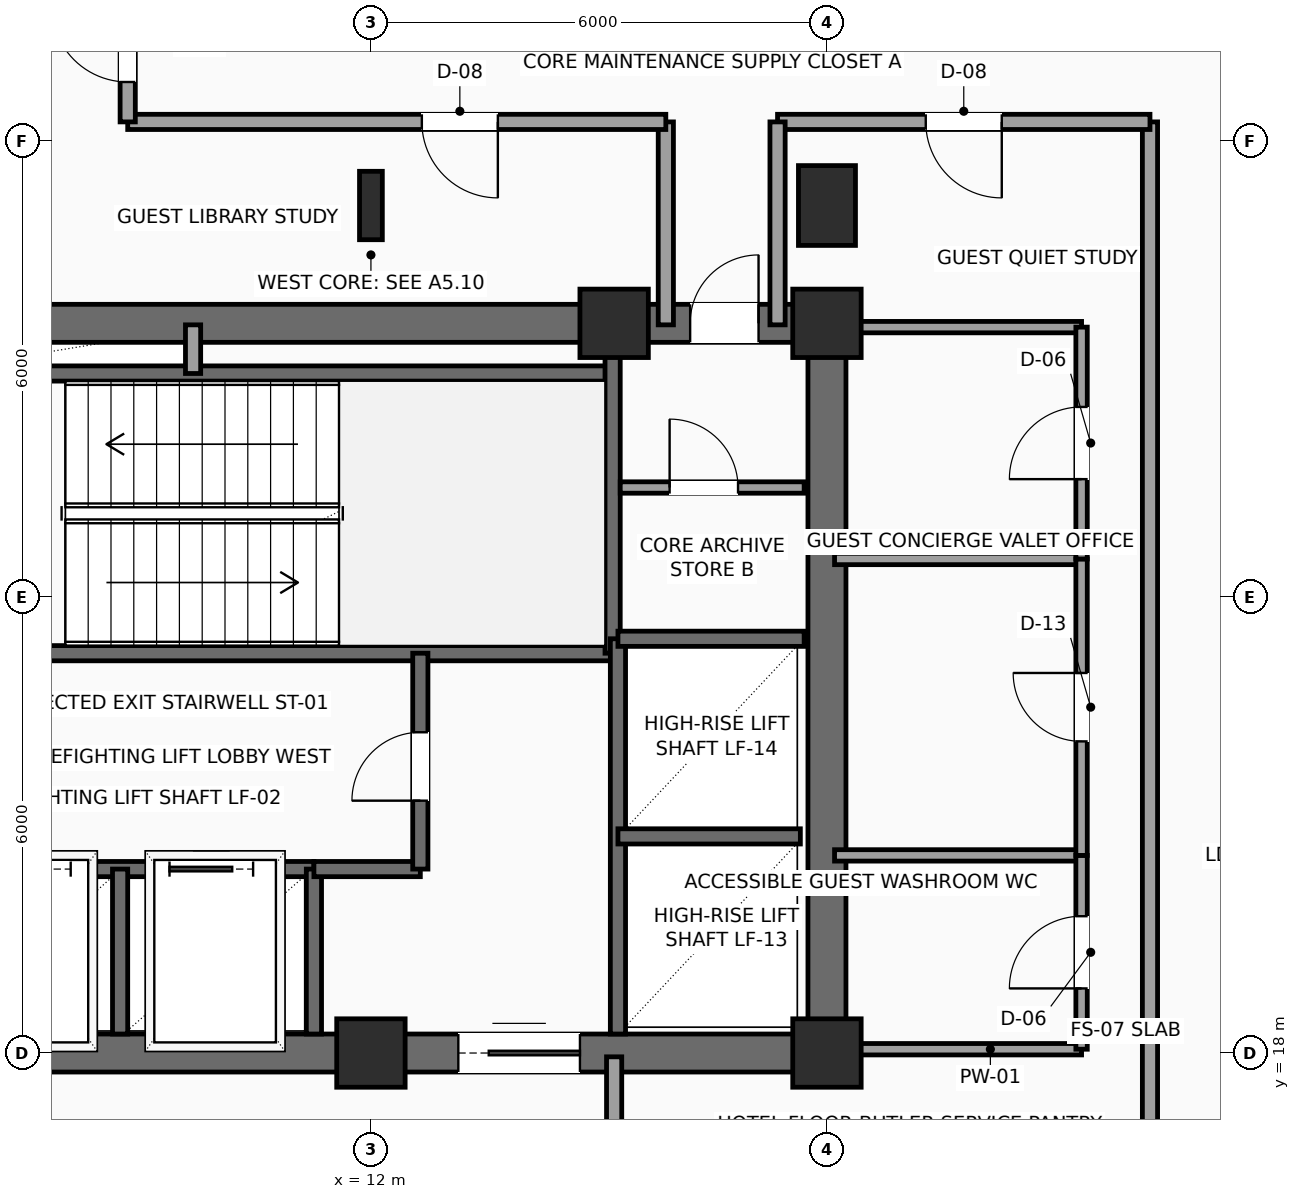
"""IFC4 building model, lengths in metres.
Left out: names, types, materials, properties, quantities, classifications, styles, units other than length and angle.
Written with IfcOpenShell. Run it as: python <this file> out.ifc"""

import sys

from ifc_helpers import new_model, si_unit, direction, frame, frame_2d, origin, origin_2d, place, context, subcontext, project, spatial, rectangle, i_section, extrude, element, fill, save


model = new_model("IFC4")
c1 = context("Model", 3, precision=1e-05, world=origin(), true_north=direction((0.0, 1.0)))
c2 = subcontext(c1, "Body", "Model", "MODEL_VIEW")
j1 = project(units=[si_unit("LENGTHUNIT", "METRE"), si_unit("PLANEANGLEUNIT", "RADIAN")], contexts=[c1])
p1 = place(None, origin())
s1 = spatial("IfcSite", under=j1, at=p1, CompositionType="ELEMENT")
p2 = place(p1, origin())
s2 = spatial("IfcBuilding", under=s1, at=p2, CompositionType="ELEMENT")
p3 = place(p2, frame((0.0, 0.0, 176.7)))
s3 = spatial("IfcBuildingStorey", under=s2, at=p3, CompositionType="ELEMENT", Elevation=176.7)
for number, where, z_axis, x_axis in (
    (1, (12.0, 18.0, 0.0), (0.0, 0.0, 1.0), (1.0, 0.0, 0.0)),
    (2, (18.0, 18.0, 0.0), (0.0, 0.0, 1.0), (1.0, 0.0, 0.0)),
    (3, (15.2, 27.6, 0.0), (0.0, 0.0, 1.0), (1.0, 0.0, 0.0)),
    (4, (18.0, 27.6, 0.0), (0.0, 0.0, 1.0), (1.0, 0.0, 0.0)),
):
    element("IfcColumn", number, at=place(p3, frame(where, z_axis=z_axis, x_axis=x_axis)), inside=s3, PredefinedType="COLUMN", context=c2, shape_type="SweptSolid", body=[
        extrude(rectangle(XDim=0.9, YDim=0.9, at=origin_2d()), origin(), (0.0, 0.0, 1.0), 3.75),
    ])
p4 = place(p3, frame((12.0, 29.15, 0.0), z_axis=(0.0, 0.0, 1.0), x_axis=(1.0, 0.0, 0.0)))
e5 = element("IfcColumn", 5, at=p4, inside=s3, PredefinedType="COLUMN", context=c2, shape_type="SweptSolid", body=[
    extrude(i_section(OverallWidth=0.3, OverallDepth=0.9, WebThickness=0.019, FlangeThickness=0.035, FilletRadius=0.03, at=origin_2d()), origin(), (0.0, 0.0, 1.0), 3.75),
])
p5 = place(p3, frame((18.0, 29.15, 0.0), z_axis=(0.0, 0.0, 1.0), x_axis=(1.0, 0.0, 0.0)))
e6 = element("IfcColumn", 6, at=p5, inside=s3, PredefinedType="COLUMN", context=c2, shape_type="SweptSolid", body=[
    extrude(rectangle(XDim=0.75, YDim=1.05, at=origin_2d()), origin(), (0.0, 0.0, 1.0), 3.75),
])
p6 = place(p3, frame((6.0, 18.0, 0.0), z_axis=(0.0, 0.0, 1.0), x_axis=(1.0, 0.0, 0.0)))
e7 = element("IfcWall", 7, at=p6, inside=s3, PredefinedType="SHEAR", context=c2, shape_type="SweptSolid", body=[
    extrude(rectangle(XDim=12.0, YDim=0.5, at=frame_2d((6.0, 0.0))), origin(), (0.0, 0.0, 1.0), 3.54),
])
p7 = place(p6, frame((7.15, 0.0, 0.0)))
e8 = element("IfcOpeningElement", 8, at=p7, cuts=e7, PredefinedType="OPENING", context=c2, shape_type="SweptSolid", body=[
    extrude(rectangle(XDim=1.6, YDim=2.3, at=frame_2d((0.8, 1.15))), frame((0.0, 0.26, 0.0), z_axis=(0.0, -1.0, 0.0), x_axis=(1.0, 0.0, 0.0)), (0.0, 0.0, 1.0), 0.52),
])
p8 = place(p3, frame((6.0, 27.6, 0.0), z_axis=(0.0, 0.0, 1.0), x_axis=(1.0, 0.0, 0.0)))
e9 = element("IfcWall", 9, at=p8, inside=s3, PredefinedType="SHEAR", context=c2, shape_type="SweptSolid", body=[
    extrude(rectangle(XDim=12.0, YDim=0.5, at=frame_2d((6.0, 0.0))), origin(), (0.0, 0.0, 1.0), 3.54),
])
p9 = place(p8, frame((10.2, 0.0, 0.0)))
e10 = element("IfcOpeningElement", 10, at=p9, cuts=e9, PredefinedType="OPENING", context=c2, shape_type="SweptSolid", body=[
    extrude(rectangle(XDim=0.9, YDim=2.15, at=frame_2d((0.45, 1.075))), frame((0.0, 0.26, 0.0), z_axis=(0.0, -1.0, 0.0), x_axis=(1.0, 0.0, 0.0)), (0.0, 0.0, 1.0), 0.52),
])
p10 = place(p3, frame((18.0, 18.0, 0.0), z_axis=(0.0, 0.0, 1.0), x_axis=(0.0, 1.0, 0.0)))
e11 = element("IfcWall", 11, at=p10, inside=s3, PredefinedType="SHEAR", context=c2, shape_type="SweptSolid", body=[
    extrude(rectangle(XDim=9.6, YDim=0.5, at=frame_2d((4.8, 0.0))), origin(), (0.0, 0.0, 1.0), 3.54),
])
p11 = place(p3, frame((6.3, 23.26, 0.0), z_axis=(0.0, 0.0, 1.0), x_axis=(1.0, 0.0, 0.0)))
e12 = element("IfcWall", 12, at=p11, inside=s3, PredefinedType="SHEAR", context=c2, shape_type="SweptSolid", body=[
    extrude(rectangle(XDim=8.88, YDim=0.2, at=frame_2d((4.44, 0.0))), origin(), (0.0, 0.0, 1.0), 3.54),
])
p12 = place(p11, frame((0.35, 0.0, 0.0)))
e13 = element("IfcOpeningElement", 13, at=p12, cuts=e12, PredefinedType="OPENING", context=c2, shape_type="SweptSolid", body=[
    extrude(rectangle(XDim=1.1, YDim=2.2, at=frame_2d((0.55, 1.1))), frame((0.0, 0.11, 0.0), z_axis=(0.0, -1.0, 0.0), x_axis=(1.0, 0.0, 0.0)), (0.0, 0.0, 1.0), 0.22),
])
p13 = place(p3, frame((6.3, 26.94, 0.0), z_axis=(0.0, 0.0, 1.0), x_axis=(1.0, 0.0, 0.0)))
e14 = element("IfcWall", 14, at=p13, inside=s3, PredefinedType="SHEAR", context=c2, shape_type="SweptSolid", body=[
    extrude(rectangle(XDim=8.88, YDim=0.2, at=frame_2d((4.44, 0.0))), origin(), (0.0, 0.0, 1.0), 3.54),
])
p14 = place(p3, frame((15.18, 23.26, 0.0), z_axis=(0.0, 0.0, 1.0), x_axis=(0.0, 1.0, 0.0)))
e15 = element("IfcWall", 15, at=p14, inside=s3, PredefinedType="SHEAR", context=c2, shape_type="SweptSolid", body=[
    extrude(rectangle(XDim=4.04, YDim=0.2, at=frame_2d((2.02, 0.0))), origin(), (0.0, 0.0, 1.0), 3.54),
])
p15 = place(p3, frame((6.3, 20.42, 0.0), z_axis=(0.0, 0.0, 1.0), x_axis=(1.0, 0.0, 0.0)))
e16 = element("IfcWall", 16, at=p15, inside=s3, PredefinedType="SHEAR", context=c2, shape_type="SweptSolid", body=[
    extrude(rectangle(XDim=4.95, YDim=0.2, at=frame_2d((2.475, 0.0))), origin(), (0.0, 0.0, 1.0), 3.54),
])
p16 = place(p15, frame((0.65, 0.0, 0.0)))
e17 = element("IfcOpeningElement", 17, at=p16, cuts=e16, PredefinedType="OPENING", context=c2, shape_type="SweptSolid", body=[
    extrude(rectangle(XDim=1.1, YDim=2.2, at=frame_2d((0.55, 1.1))), frame((0.0, 0.11, 0.0), z_axis=(0.0, -1.0, 0.0), x_axis=(1.0, 0.0, 0.0)), (0.0, 0.0, 1.0), 0.22),
])
p17 = place(p15, frame((3.05, 0.0, 0.0)))
e18 = element("IfcOpeningElement", 18, at=p17, cuts=e16, PredefinedType="OPENING", context=c2, shape_type="SweptSolid", body=[
    extrude(rectangle(XDim=1.1, YDim=2.2, at=frame_2d((0.55, 1.1))), frame((0.0, 0.11, 0.0), z_axis=(0.0, -1.0, 0.0), x_axis=(1.0, 0.0, 0.0)), (0.0, 0.0, 1.0), 0.22),
])
for number, where, z_axis, x_axis in (
    (19, (8.7, 18.25, 0.0), (0.0, 0.0, 1.0), (0.0, 1.0, 0.0)),
    (20, (11.25, 18.25, 0.0), (0.0, 0.0, 1.0), (0.0, 1.0, 0.0)),
):
    element("IfcWall", number, at=place(p3, frame(where, z_axis=z_axis, x_axis=x_axis)), inside=s3, PredefinedType="SHEAR", context=c2, shape_type="SweptSolid", body=[
        extrude(rectangle(XDim=2.17, YDim=0.2, at=frame_2d((1.085, 0.0))), origin(), (0.0, 0.0, 1.0), 3.54),
    ])
p18 = place(p3, frame((11.25, 20.42, 0.0), z_axis=(0.0, 0.0, 1.0), x_axis=(1.0, 0.0, 0.0)))
e21 = element("IfcWall", 21, at=p18, inside=s3, PredefinedType="SHEAR", context=c2, shape_type="SweptSolid", body=[
    extrude(rectangle(XDim=1.4, YDim=0.2, at=frame_2d((0.7, 0.0))), origin(), (0.0, 0.0, 1.0), 3.54),
])
p19 = place(p3, frame((12.65, 20.42, 0.0), z_axis=(0.0, 0.0, 1.0), x_axis=(0.0, 1.0, 0.0)))
e22 = element("IfcWall", 22, at=p19, inside=s3, PredefinedType="SHEAR", context=c2, shape_type="SweptSolid", body=[
    extrude(rectangle(XDim=2.84, YDim=0.2, at=frame_2d((1.42, 0.0))), origin(), (0.0, 0.0, 1.0), 3.54),
])
p20 = place(p19, frame((0.9, 0.0, 0.0)))
e23 = element("IfcOpeningElement", 23, at=p20, cuts=e22, PredefinedType="OPENING", context=c2, shape_type="SweptSolid", body=[
    extrude(rectangle(XDim=0.9, YDim=2.15, at=frame_2d((0.45, 1.075))), frame((0.0, 0.11, 0.0), z_axis=(0.0, -1.0, 0.0), x_axis=(1.0, 0.0, 0.0)), (0.0, 0.0, 1.0), 0.22),
])
p21 = place(p3, frame((9.66, 26.94, 0.0), z_axis=(0.0, 0.0, 1.0), x_axis=(0.0, 1.0, 0.0)))
e24 = element("IfcWall", 24, at=p21, inside=s3, PredefinedType="SOLIDWALL", context=c2, shape_type="SweptSolid", body=[
    extrude(rectangle(XDim=0.64, YDim=0.2, at=frame_2d((0.32, 0.0))), origin(), (0.0, 0.0, 1.0), 3.54),
])
p22 = place(p3, frame((15.25, 18.25, 0.0), z_axis=(0.0, 0.0, 1.0), x_axis=(0.0, 1.0, 0.0)))
e25 = element("IfcWall", 25, at=p22, inside=s3, PredefinedType="SHEAR", context=c2, shape_type="SweptSolid", body=[
    extrude(rectangle(XDim=5.2, YDim=0.2, at=frame_2d((2.6, 0.0))), origin(), (0.0, 0.0, 1.0), 3.54),
])
p23 = place(p3, frame((15.25, 20.85, 0.0), z_axis=(0.0, 0.0, 1.0), x_axis=(1.0, 0.0, 0.0)))
e26 = element("IfcWall", 26, at=p23, inside=s3, PredefinedType="SHEAR", context=c2, shape_type="SweptSolid", body=[
    extrude(rectangle(XDim=2.4, YDim=0.2, at=frame_2d((1.2, 0.0))), origin(), (0.0, 0.0, 1.0), 3.54),
])
p24 = place(p3, frame((15.25, 23.45, 0.0), z_axis=(0.0, 0.0, 1.0), x_axis=(1.0, 0.0, 0.0)))
e27 = element("IfcWall", 27, at=p24, inside=s3, PredefinedType="SHEAR", context=c2, shape_type="SweptSolid", body=[
    extrude(rectangle(XDim=2.45, YDim=0.2, at=frame_2d((1.225, 0.0))), origin(), (0.0, 0.0, 1.0), 3.54),
])
p25 = place(p3, frame((15.28, 25.44, 0.0), z_axis=(0.0, 0.0, 1.0), x_axis=(1.0, 0.0, 0.0)))
e28 = element("IfcWall", 28, at=p25, inside=s3, PredefinedType="PARTITIONING", context=c2, shape_type="SweptSolid", body=[
    extrude(rectangle(XDim=2.42, YDim=0.15, at=frame_2d((1.21, 0.0))), origin(), (0.0, 0.0, 1.0), 3.54),
])
p26 = place(p25, frame((0.65, 0.0, 0.0)))
e29 = element("IfcOpeningElement", 29, at=p26, cuts=e28, PredefinedType="OPENING", context=c2, shape_type="SweptSolid", body=[
    extrude(rectangle(XDim=0.9, YDim=2.15, at=frame_2d((0.45, 1.075))), frame((0.0, 0.085, 0.0), z_axis=(0.0, -1.0, 0.0), x_axis=(1.0, 0.0, 0.0)), (0.0, 0.0, 1.0), 0.17),
])
p27 = place(p3, frame((15.2, 17.95, 0.0), z_axis=(0.0, 0.0, 1.0), x_axis=(0.0, -1.0, 0.0)))
e30 = element("IfcWall", 30, at=p27, inside=s3, PredefinedType="PARTITIONING", context=c2, shape_type="SweptSolid", body=[
    extrude(rectangle(XDim=1.7, YDim=0.2, at=frame_2d((0.85, 0.0))), origin(), (0.0, 0.0, 1.0), 3.54),
])
p28 = place(p3, frame((22.25, 11.05, 0.0), z_axis=(0.0, 0.0, 1.0), x_axis=(0.0, 1.0, 0.0)))
e31 = element("IfcWall", 31, at=p28, inside=s3, PredefinedType="PARTITIONING", context=c2, shape_type="SweptSolid", body=[
    extrude(rectangle(XDim=19.2, YDim=0.2, at=frame_2d((9.6, 0.0))), origin(), (0.0, 0.0, 1.0), 3.54),
])
p29 = place(p3, frame((22.25, 30.25, 0.0), z_axis=(0.0, 0.0, 1.0), x_axis=(-1.0, 0.0, 0.0)))
e32 = element("IfcWall", 32, at=p29, inside=s3, PredefinedType="PARTITIONING", context=c2, shape_type="SweptSolid", body=[
    extrude(rectangle(XDim=4.9, YDim=0.2, at=frame_2d((2.45, 0.0))), origin(), (0.0, 0.0, 1.0), 3.54),
])
p30 = place(p29, frame((1.95, 0.0, 0.0)))
e33 = element("IfcOpeningElement", 33, at=p30, cuts=e32, PredefinedType="OPENING", context=c2, shape_type="SweptSolid", body=[
    extrude(rectangle(XDim=1.0, YDim=2.2, at=frame_2d((0.5, 1.1))), frame((0.0, 0.11, 0.0), z_axis=(0.0, -1.0, 0.0), x_axis=(1.0, 0.0, 0.0)), (0.0, 0.0, 1.0), 0.22),
])
for number, where, z_axis, x_axis in (
    (34, (17.35, 30.25, 0.0), (0.0, 0.0, 1.0), (0.0, -1.0, 0.0)),
    (35, (15.88, 27.58, 0.0), (0.0, 0.0, 1.0), (0.0, 1.0, 0.0)),
):
    element("IfcWall", number, at=place(p3, frame(where, z_axis=z_axis, x_axis=x_axis)), inside=s3, PredefinedType="PARTITIONING", context=c2, shape_type="SweptSolid", body=[
        extrude(rectangle(XDim=2.67, YDim=0.2, at=frame_2d((1.335, 0.0))), origin(), (0.0, 0.0, 1.0), 3.54),
    ])
p31 = place(p3, frame((15.88, 30.25, 0.0), z_axis=(0.0, 0.0, 1.0), x_axis=(-1.0, 0.0, 0.0)))
e36 = element("IfcWall", 36, at=p31, inside=s3, PredefinedType="PARTITIONING", context=c2, shape_type="SweptSolid", body=[
    extrude(rectangle(XDim=7.08, YDim=0.2, at=frame_2d((3.54, 0.0))), origin(), (0.0, 0.0, 1.0), 3.54),
])
p32 = place(p31, frame((2.21, 0.0, 0.0)))
e37 = element("IfcOpeningElement", 37, at=p32, cuts=e36, PredefinedType="OPENING", context=c2, shape_type="SweptSolid", body=[
    extrude(rectangle(XDim=1.0, YDim=2.2, at=frame_2d((0.5, 1.1))), frame((0.0, 0.11, 0.0), z_axis=(0.0, -1.0, 0.0), x_axis=(1.0, 0.0, 0.0)), (0.0, 0.0, 1.0), 0.22),
])
p33 = place(p3, frame((8.8, 30.25, 0.0), z_axis=(0.0, 0.0, 1.0), x_axis=(0.0, 1.0, 0.0)))
e38 = element("IfcWall", 38, at=p33, inside=s3, PredefinedType="PARTITIONING", context=c2, shape_type="SweptSolid", body=[
    extrude(rectangle(XDim=2.05, YDim=0.2, at=frame_2d((1.025, 0.0))), origin(), (0.0, 0.0, 1.0), 3.54),
])
p34 = place(p33, frame((0.525, 0.0, 0.0)))
e39 = element("IfcOpeningElement", 39, at=p34, cuts=e38, PredefinedType="OPENING", context=c2, shape_type="SweptSolid", body=[
    extrude(rectangle(XDim=1.0, YDim=2.2, at=frame_2d((0.5, 1.1))), frame((0.0, 0.11, 0.0), z_axis=(0.0, -1.0, 0.0), x_axis=(1.0, 0.0, 0.0)), (0.0, 0.0, 1.0), 0.22),
])
p35 = place(p3, frame((18.1, 18.05, 0.0), z_axis=(0.0, 0.0, 1.0), x_axis=(1.0, 0.0, 0.0)))
e40 = element("IfcWall", 40, at=p35, inside=s3, PredefinedType="PARTITIONING", context=c2, shape_type="SweptSolid", body=[
    extrude(rectangle(XDim=3.25, YDim=0.15, at=frame_2d((1.625, 0.0))), origin(), (0.0, 0.0, 1.0), 3.132),
])
p36 = place(p3, frame((18.1, 20.6, 0.0), z_axis=(0.0, 0.0, 1.0), x_axis=(1.0, 0.0, 0.0)))
e41 = element("IfcWall", 41, at=p36, inside=s3, PredefinedType="PARTITIONING", context=c2, shape_type="SweptSolid", body=[
    extrude(rectangle(XDim=3.25, YDim=0.15, at=frame_2d((1.625, 0.0))), origin(), (0.0, 0.0, 1.0), 3.54),
])
p37 = place(p3, frame((21.35, 18.05, 0.0), z_axis=(0.0, 0.0, 1.0), x_axis=(0.0, 1.0, 0.0)))
e42 = element("IfcWall", 42, at=p37, inside=s3, PredefinedType="PARTITIONING", context=c2, shape_type="SweptSolid", body=[
    extrude(rectangle(XDim=2.55, YDim=0.15, at=frame_2d((1.275, 0.0))), origin(), (0.0, 0.0, 1.0), 3.54),
])
p38 = place(p37, frame((0.8, 0.0, 0.0)))
e43 = element("IfcOpeningElement", 43, at=p38, cuts=e42, PredefinedType="OPENING", context=c2, shape_type="SweptSolid", body=[
    extrude(rectangle(XDim=0.95, YDim=2.15, at=frame_2d((0.475, 1.075))), frame((0.0, 0.085, 0.0), z_axis=(0.0, -1.0, 0.0), x_axis=(1.0, 0.0, 0.0)), (0.0, 0.0, 1.0), 0.17),
])
p39 = place(p3, frame((18.1, 24.5, 0.0), z_axis=(0.0, 0.0, 1.0), x_axis=(1.0, 0.0, 0.0)))
e44 = element("IfcWall", 44, at=p39, inside=s3, PredefinedType="PARTITIONING", context=c2, shape_type="SweptSolid", body=[
    extrude(rectangle(XDim=3.25, YDim=0.15, at=frame_2d((1.625, 0.0))), origin(), (0.0, 0.0, 1.0), 3.54),
])
p40 = place(p3, frame((21.35, 20.6, 0.0), z_axis=(0.0, 0.0, 1.0), x_axis=(0.0, 1.0, 0.0)))
e45 = element("IfcWall", 45, at=p40, inside=s3, PredefinedType="PARTITIONING", context=c2, shape_type="SweptSolid", body=[
    extrude(rectangle(XDim=3.9, YDim=0.15, at=frame_2d((1.95, 0.0))), origin(), (0.0, 0.0, 1.0), 3.54),
])
p41 = place(p40, frame((1.5, 0.0, 0.0)))
e46 = element("IfcOpeningElement", 46, at=p41, cuts=e45, PredefinedType="OPENING", context=c2, shape_type="SweptSolid", body=[
    extrude(rectangle(XDim=0.9, YDim=2.1, at=frame_2d((0.45, 1.05))), frame((0.0, 0.085, 0.0), z_axis=(0.0, -1.0, 0.0), x_axis=(1.0, 0.0, 0.0)), (0.0, 0.0, 1.0), 0.17),
])
p42 = place(p3, frame((18.1, 27.55, 0.0), z_axis=(0.0, 0.0, 1.0), x_axis=(1.0, 0.0, 0.0)))
e47 = element("IfcWall", 47, at=p42, inside=s3, PredefinedType="PARTITIONING", context=c2, shape_type="SweptSolid", body=[
    extrude(rectangle(XDim=3.25, YDim=0.15, at=frame_2d((1.625, 0.0))), origin(), (0.0, 0.0, 1.0), 3.54),
])
p43 = place(p3, frame((21.35, 24.5, 0.0), z_axis=(0.0, 0.0, 1.0), x_axis=(0.0, 1.0, 0.0)))
e48 = element("IfcWall", 48, at=p43, inside=s3, PredefinedType="PARTITIONING", context=c2, shape_type="SweptSolid", body=[
    extrude(rectangle(XDim=3.05, YDim=0.15, at=frame_2d((1.525, 0.0))), origin(), (0.0, 0.0, 1.0), 3.54),
])
p44 = place(p43, frame((1.05, 0.0, 0.0)))
e49 = element("IfcOpeningElement", 49, at=p44, cuts=e48, PredefinedType="OPENING", context=c2, shape_type="SweptSolid", body=[
    extrude(rectangle(XDim=0.95, YDim=2.15, at=frame_2d((0.475, 1.075))), frame((0.0, 0.085, 0.0), z_axis=(0.0, -1.0, 0.0), x_axis=(1.0, 0.0, 0.0)), (0.0, 0.0, 1.0), 0.17),
])
p45 = place(p7, origin())
e50 = element("IfcDoor", 50, at=p45, inside=s3, OperationType="DOUBLE_DOOR_SLIDING", PredefinedType="DOOR", context=c2, shape_type="SweptSolid", body=[
    extrude(rectangle(XDim=1.6, YDim=2.3, at=frame_2d((0.8, 1.15))), frame((0.0, 0.025, 0.0), z_axis=(0.0, -1.0, 0.0), x_axis=(1.0, 0.0, 0.0)), (0.0, 0.0, 1.0), 0.05),
])
fill(e8, e50)
p46 = place(p9, origin())
e51 = element("IfcDoor", 51, at=p46, inside=s3, OperationType="SINGLE_SWING_RIGHT", PredefinedType="DOOR", context=c2, shape_type="SweptSolid", body=[
    extrude(rectangle(XDim=0.9, YDim=2.15, at=frame_2d((0.45, 1.075))), frame((0.0, 0.025, 0.0), z_axis=(0.0, -1.0, 0.0), x_axis=(1.0, 0.0, 0.0)), (0.0, 0.0, 1.0), 0.05),
])
fill(e10, e51)
p47 = place(p16, origin())
e52 = element("IfcDoor", 52, at=p47, inside=s3, OperationType="SLIDING_TO_LEFT", PredefinedType="DOOR", context=c2, shape_type="SweptSolid", body=[
    extrude(rectangle(XDim=1.1, YDim=2.2, at=frame_2d((0.55, 1.1))), frame((0.0, 0.025, 0.0), z_axis=(0.0, -1.0, 0.0), x_axis=(1.0, 0.0, 0.0)), (0.0, 0.0, 1.0), 0.05),
])
fill(e17, e52)
p48 = place(p17, origin())
e53 = element("IfcDoor", 53, at=p48, inside=s3, OperationType="SLIDING_TO_LEFT", PredefinedType="DOOR", context=c2, shape_type="SweptSolid", body=[
    extrude(rectangle(XDim=1.1, YDim=2.2, at=frame_2d((0.55, 1.1))), frame((0.0, 0.025, 0.0), z_axis=(0.0, -1.0, 0.0), x_axis=(1.0, 0.0, 0.0)), (0.0, 0.0, 1.0), 0.05),
])
fill(e18, e53)
p49 = place(p20, origin())
e54 = element("IfcDoor", 54, at=p49, inside=s3, OperationType="SINGLE_SWING_LEFT", PredefinedType="DOOR", context=c2, shape_type="SweptSolid", body=[
    extrude(rectangle(XDim=0.9, YDim=2.15, at=frame_2d((0.45, 1.075))), frame((0.0, 0.025, 0.0), z_axis=(0.0, -1.0, 0.0), x_axis=(1.0, 0.0, 0.0)), (0.0, 0.0, 1.0), 0.05),
])
fill(e23, e54)
p50 = place(p26, origin())
e55 = element("IfcDoor", 55, at=p50, inside=s3, OperationType="SINGLE_SWING_LEFT", PredefinedType="DOOR", context=c2, shape_type="SweptSolid", body=[
    extrude(rectangle(XDim=0.9, YDim=2.15, at=frame_2d((0.45, 1.075))), frame((0.0, 0.025, 0.0), z_axis=(0.0, -1.0, 0.0), x_axis=(1.0, 0.0, 0.0)), (0.0, 0.0, 1.0), 0.05),
])
fill(e29, e55)
p51 = place(p30, origin())
e56 = element("IfcDoor", 56, at=p51, inside=s3, OperationType="SINGLE_SWING_LEFT", PredefinedType="DOOR", context=c2, shape_type="SweptSolid", body=[
    extrude(rectangle(XDim=1.0, YDim=2.2, at=frame_2d((0.5, 1.1))), frame((0.0, 0.025, 0.0), z_axis=(0.0, -1.0, 0.0), x_axis=(1.0, 0.0, 0.0)), (0.0, 0.0, 1.0), 0.05),
])
fill(e33, e56)
p52 = place(p32, origin())
e57 = element("IfcDoor", 57, at=p52, inside=s3, OperationType="SINGLE_SWING_LEFT", PredefinedType="DOOR", context=c2, shape_type="SweptSolid", body=[
    extrude(rectangle(XDim=1.0, YDim=2.2, at=frame_2d((0.5, 1.1))), frame((0.0, 0.025, 0.0), z_axis=(0.0, -1.0, 0.0), x_axis=(1.0, 0.0, 0.0)), (0.0, 0.0, 1.0), 0.05),
])
fill(e37, e57)
p53 = place(p34, origin())
e58 = element("IfcDoor", 58, at=p53, inside=s3, OperationType="SINGLE_SWING_RIGHT", PredefinedType="DOOR", context=c2, shape_type="SweptSolid", body=[
    extrude(rectangle(XDim=1.0, YDim=2.2, at=frame_2d((0.5, 1.1))), frame((0.0, 0.025, 0.0), z_axis=(0.0, -1.0, 0.0), x_axis=(1.0, 0.0, 0.0)), (0.0, 0.0, 1.0), 0.05),
])
fill(e39, e58)
p54 = place(p38, origin())
e59 = element("IfcDoor", 59, at=p54, inside=s3, OperationType="SINGLE_SWING_LEFT", PredefinedType="DOOR", context=c2, shape_type="SweptSolid", body=[
    extrude(rectangle(XDim=0.95, YDim=2.15, at=frame_2d((0.475, 1.075))), frame((0.0, 0.025, 0.0), z_axis=(0.0, -1.0, 0.0), x_axis=(1.0, 0.0, 0.0)), (0.0, 0.0, 1.0), 0.05),
])
fill(e43, e59)
p55 = place(p41, origin())
e60 = element("IfcDoor", 60, at=p55, inside=s3, OperationType="SINGLE_SWING_RIGHT", PredefinedType="DOOR", context=c2, shape_type="SweptSolid", body=[
    extrude(rectangle(XDim=0.9, YDim=2.1, at=frame_2d((0.45, 1.05))), frame((0.0, 0.025, 0.0), z_axis=(0.0, -1.0, 0.0), x_axis=(1.0, 0.0, 0.0)), (0.0, 0.0, 1.0), 0.05),
])
fill(e46, e60)
p56 = place(p44, origin())
e61 = element("IfcDoor", 61, at=p56, inside=s3, OperationType="SINGLE_SWING_LEFT", PredefinedType="DOOR", context=c2, shape_type="SweptSolid", body=[
    extrude(rectangle(XDim=0.95, YDim=2.15, at=frame_2d((0.475, 1.075))), frame((0.0, 0.025, 0.0), z_axis=(0.0, -1.0, 0.0), x_axis=(1.0, 0.0, 0.0)), (0.0, 0.0, 1.0), 0.05),
])
fill(e49, e61)
save(model, sys.argv[1])
